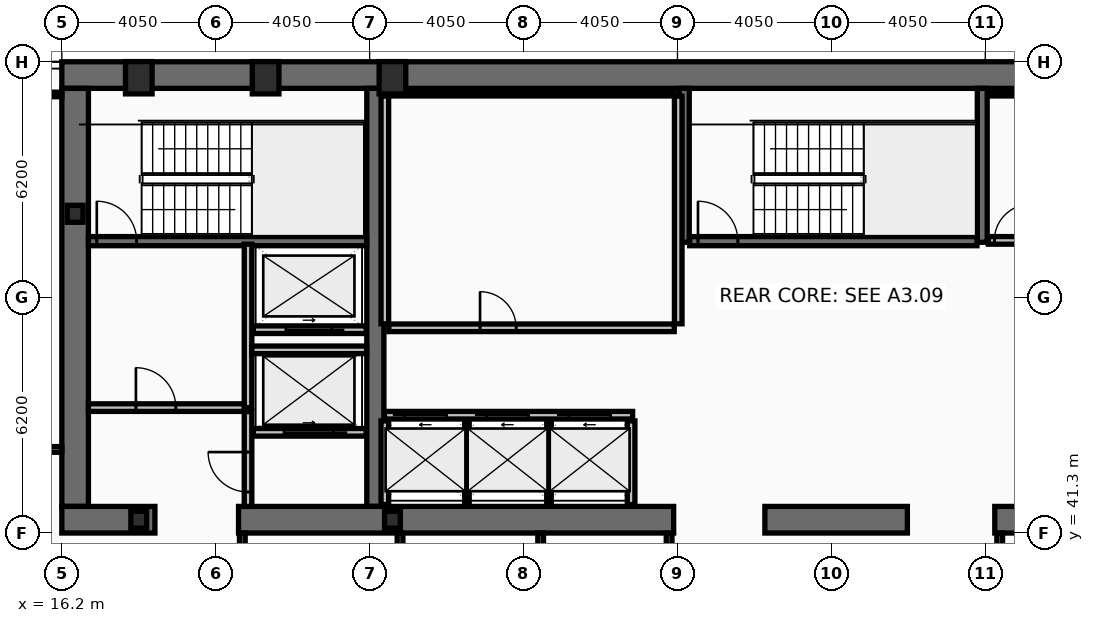
"""IFC4 building model, lengths in metres.
Left out: names, types, materials, properties, quantities, classifications, styles, units other than length and angle.
Written with IfcOpenShell. Run it as: python <this file> out.ifc"""

import sys

from ifc_helpers import new_model, si_unit, direction, frame, frame_2d, origin, origin_2d, place, context, subcontext, project, spatial, rectangle, hollow_rectangle, i_section, extrude, element, fill, save


model = new_model("IFC4")
c1 = context("Model", 3, precision=1e-05, world=origin(), true_north=direction((0.0, 1.0)))
c2 = subcontext(c1, "Body", "Model", "MODEL_VIEW")
j1 = project(units=[si_unit("LENGTHUNIT", "METRE"), si_unit("PLANEANGLEUNIT", "RADIAN")], contexts=[c1])
p1 = place(None, origin())
s1 = spatial("IfcSite", under=j1, at=p1, CompositionType="ELEMENT")
p2 = place(p1, origin())
s2 = spatial("IfcBuilding", under=s1, at=p2, CompositionType="ELEMENT")
p3 = place(p2, frame((0.0, 0.0, 136.2)))
s3 = spatial("IfcBuildingStorey", under=s2, at=p3, CompositionType="ELEMENT", Elevation=136.2)
p4 = place(p3, frame((16.2, 53.35, 0.0), z_axis=(0.0, 0.0, 1.0), x_axis=(1.0, 0.0, 0.0)))
e1 = element("IfcWall", 1, at=p4, inside=s3, PredefinedType="SHEAR", context=c2, shape_type="SweptSolid", body=[
    extrude(rectangle(XDim=40.5, YDim=0.7, at=frame_2d((20.25, 0.0))), origin(), (0.0, 0.0, 1.0), 3.44),
])
p5 = place(p3, frame((16.55, 42.0, 0.0), z_axis=(0.0, 0.0, 1.0), x_axis=(0.0, 1.0, 0.0)))
e2 = element("IfcWall", 2, at=p5, inside=s3, PredefinedType="SHEAR", context=c2, shape_type="SweptSolid", body=[
    extrude(rectangle(XDim=11.0, YDim=0.7, at=frame_2d((5.5, 0.0))), origin(), (0.0, 0.0, 1.0), 3.44),
])
p6 = place(p3, frame((24.45, 42.0, 0.0), z_axis=(0.0, 0.0, 1.0), x_axis=(0.0, 1.0, 0.0)))
e3 = element("IfcWall", 3, at=p6, inside=s3, PredefinedType="SHEAR", context=c2, shape_type="SweptSolid", body=[
    extrude(rectangle(XDim=11.0, YDim=0.45, at=frame_2d((5.5, 0.0))), origin(), (0.0, 0.0, 1.0), 3.44),
])
p7 = place(p3, frame((18.65, 41.65, 0.0), z_axis=(0.0, 0.0, 1.0), x_axis=(-1.0, 0.0, 0.0)))
e4 = element("IfcWall", 4, at=p7, inside=s3, PredefinedType="SHEAR", context=c2, shape_type="SweptSolid", body=[
    extrude(rectangle(XDim=2.45, YDim=0.7, at=frame_2d((1.225, 0.0))), origin(), (0.0, 0.0, 1.0), 3.44),
])
p8 = place(p3, frame((32.3, 41.65, 0.0), z_axis=(0.0, 0.0, 1.0), x_axis=(-1.0, 0.0, 0.0)))
e5 = element("IfcWall", 5, at=p8, inside=s3, PredefinedType="SHEAR", context=c2, shape_type="SweptSolid", body=[
    extrude(rectangle(XDim=11.45, YDim=0.7, at=frame_2d((5.725, 0.0))), origin(), (0.0, 0.0, 1.0), 3.44),
])
p9 = place(p3, frame((38.45, 41.65, 0.0), z_axis=(0.0, 0.0, 1.0), x_axis=(-1.0, 0.0, 0.0)))
e6 = element("IfcWall", 6, at=p9, inside=s3, PredefinedType="SHEAR", context=c2, shape_type="SweptSolid", body=[
    extrude(rectangle(XDim=3.75, YDim=0.7, at=frame_2d((1.875, 0.0))), origin(), (0.0, 0.0, 1.0), 3.44),
])
p10 = place(p3, frame((52.05, 41.65, 0.0), z_axis=(0.0, 0.0, 1.0), x_axis=(-1.0, 0.0, 0.0)))
e7 = element("IfcWall", 7, at=p10, inside=s3, PredefinedType="SHEAR", context=c2, shape_type="SweptSolid", body=[
    extrude(rectangle(XDim=11.3, YDim=0.7, at=frame_2d((5.65, 0.0))), origin(), (0.0, 0.0, 1.0), 3.44),
])
for number, where, z_axis, x_axis in (
    (8, (32.58, 48.95, 0.0), (0.0, 0.0, 1.0), (0.0, 1.0, 0.0)),
    (9, (40.42, 48.95, 0.0), (0.0, 0.0, 1.0), (0.0, 1.0, 0.0)),
):
    element("IfcWall", number, at=place(p3, frame(where, z_axis=z_axis, x_axis=x_axis)), inside=s3, PredefinedType="SHEAR", context=c2, shape_type="SweptSolid", body=[
        extrude(rectangle(XDim=4.05, YDim=0.26, at=frame_2d((2.025, 0.0))), origin(), (0.0, 0.0, 1.0), 3.44),
    ])
p11 = place(p3, frame((16.9, 48.98, 0.0), z_axis=(0.0, 0.0, 1.0), x_axis=(1.0, 0.0, 0.0)))
e10 = element("IfcWall", 10, at=p11, inside=s3, PredefinedType="SHEAR", context=c2, shape_type="SweptSolid", body=[
    extrude(rectangle(XDim=7.32, YDim=0.24, at=frame_2d((3.66, 0.0))), origin(), (0.0, 0.0, 1.0), 3.44),
])
p12 = place(p11, frame((0.22, 0.0, 0.0)))
e11 = element("IfcOpeningElement", 11, at=p12, cuts=e10, PredefinedType="OPENING", context=c2, shape_type="SweptSolid", body=[
    extrude(rectangle(XDim=1.05, YDim=2.15, at=frame_2d((0.525, 1.075))), frame((0.0, 0.13, 0.0), z_axis=(0.0, -1.0, 0.0), x_axis=(1.0, 0.0, 0.0)), (0.0, 0.0, 1.0), 0.26),
])
p13 = place(p3, frame((32.72, 48.98, 0.0), z_axis=(0.0, 0.0, 1.0), x_axis=(1.0, 0.0, 0.0)))
e12 = element("IfcWall", 12, at=p13, inside=s3, PredefinedType="SHEAR", context=c2, shape_type="SweptSolid", body=[
    extrude(rectangle(XDim=7.56, YDim=0.24, at=frame_2d((3.78, 0.0))), origin(), (0.0, 0.0, 1.0), 3.44),
])
p14 = place(p13, frame((0.22, 0.0, 0.0)))
e13 = element("IfcOpeningElement", 13, at=p14, cuts=e12, PredefinedType="OPENING", context=c2, shape_type="SweptSolid", body=[
    extrude(rectangle(XDim=1.05, YDim=2.15, at=frame_2d((0.525, 1.075))), frame((0.0, 0.13, 0.0), z_axis=(0.0, -1.0, 0.0), x_axis=(1.0, 0.0, 0.0)), (0.0, 0.0, 1.0), 0.26),
])
for number, where, z_axis, x_axis in (
    (14, (18.225, 53.28, 0.0), (0.0, 0.0, 1.0), (1.0, 0.0, 0.0)),
    (15, (21.562, 53.28, 0.0), (0.0, 0.0, 1.0), (1.0, 0.0, 0.0)),
    (16, (24.9, 53.28, 0.0), (0.0, 0.0, 1.0), (1.0, 0.0, 0.0)),
):
    element("IfcColumn", number, at=place(p3, frame(where, z_axis=z_axis, x_axis=x_axis)), inside=s3, PredefinedType="COLUMN", context=c2, shape_type="SweptSolid", body=[
        extrude(hollow_rectangle(XDim=0.7, YDim=0.85, WallThickness=0.05, at=origin_2d()), origin(), (0.0, 0.0, 1.0), 3.6),
    ])
for number, where, z_axis, x_axis in (
    (17, (16.55, 49.7, 0.0), (0.0, 0.0, 1.0), (1.0, 0.0, 0.0)),
    (18, (18.225, 41.65, 0.0), (0.0, 0.0, 1.0), (1.0, 0.0, 0.0)),
    (19, (24.9, 41.65, 0.0), (0.0, 0.0, 1.0), (1.0, 0.0, 0.0)),
):
    element("IfcColumn", number, at=place(p3, frame(where, z_axis=z_axis, x_axis=x_axis)), inside=s3, PredefinedType="COLUMN", context=c2, shape_type="SweptSolid", body=[
        extrude(i_section(OverallWidth=0.416, OverallDepth=0.446, WebThickness=0.039, FlangeThickness=0.063, at=origin_2d()), origin(), (0.0, 0.0, 1.0), 3.6),
    ])
p15 = place(p3, frame((24.69, 44.4, 0.0), z_axis=(0.0, 0.0, 1.0), x_axis=(1.0, 0.0, 0.0)))
e20 = element("IfcWall", 20, at=p15, inside=s3, PredefinedType="PARTITIONING", context=c2, shape_type="SweptSolid", body=[
    extrude(rectangle(XDim=6.53, YDim=0.2, at=frame_2d((3.265, 0.0))), origin(), (0.0, 0.0, 1.0), 3.44),
])
p16 = place(p15, frame((0.53, 0.0, 0.0)))
e21 = element("IfcOpeningElement", 21, at=p16, cuts=e20, PredefinedType="OPENING", context=c2, shape_type="SweptSolid", body=[
    extrude(rectangle(XDim=1.1, YDim=2.18, at=frame_2d((0.55, 1.09))), frame((0.0, 0.11, 0.0), z_axis=(0.0, -1.0, 0.0), x_axis=(1.0, 0.0, 0.0)), (0.0, 0.0, 1.0), 0.22),
])
p17 = place(p15, frame((2.69, 0.0, 0.0)))
e22 = element("IfcOpeningElement", 22, at=p17, cuts=e20, PredefinedType="OPENING", context=c2, shape_type="SweptSolid", body=[
    extrude(rectangle(XDim=1.1, YDim=2.18, at=frame_2d((0.55, 1.09))), frame((0.0, 0.11, 0.0), z_axis=(0.0, -1.0, 0.0), x_axis=(1.0, 0.0, 0.0)), (0.0, 0.0, 1.0), 0.22),
])
p18 = place(p15, frame((4.85, 0.0, 0.0)))
e23 = element("IfcOpeningElement", 23, at=p18, cuts=e20, PredefinedType="OPENING", context=c2, shape_type="SweptSolid", body=[
    extrude(rectangle(XDim=1.1, YDim=2.18, at=frame_2d((0.55, 1.09))), frame((0.0, 0.11, 0.0), z_axis=(0.0, -1.0, 0.0), x_axis=(1.0, 0.0, 0.0)), (0.0, 0.0, 1.0), 0.22),
])
p19 = place(p3, frame((24.21, 43.95, 0.0), z_axis=(0.0, 0.0, 1.0), x_axis=(-1.0, 0.0, 0.0)))
e24 = element("IfcWall", 24, at=p19, inside=s3, PredefinedType="PARTITIONING", context=c2, shape_type="SweptSolid", body=[
    extrude(rectangle(XDim=2.97, YDim=0.2, at=frame_2d((1.485, 0.0))), origin(), (0.0, 0.0, 1.0), 3.44),
])
p20 = place(p19, frame((0.86, 0.0, 0.0)))
e25 = element("IfcOpeningElement", 25, at=p20, cuts=e24, PredefinedType="OPENING", context=c2, shape_type="SweptSolid", body=[
    extrude(rectangle(XDim=1.3, YDim=2.18, at=frame_2d((0.65, 1.09))), frame((0.0, 0.11, 0.0), z_axis=(0.0, -1.0, 0.0), x_axis=(1.0, 0.0, 0.0)), (0.0, 0.0, 1.0), 0.22),
])
p21 = place(p3, frame((24.21, 46.65, 0.0), z_axis=(0.0, 0.0, 1.0), x_axis=(-1.0, 0.0, 0.0)))
e26 = element("IfcWall", 26, at=p21, inside=s3, PredefinedType="PARTITIONING", context=c2, shape_type="SweptSolid", body=[
    extrude(rectangle(XDim=2.97, YDim=0.2, at=frame_2d((1.485, 0.0))), origin(), (0.0, 0.0, 1.0), 3.44),
])
p22 = place(p21, frame((0.91, 0.0, 0.0)))
e27 = element("IfcOpeningElement", 27, at=p22, cuts=e26, PredefinedType="OPENING", context=c2, shape_type="SweptSolid", body=[
    extrude(rectangle(XDim=1.2, YDim=2.18, at=frame_2d((0.6, 1.09))), frame((0.0, 0.11, 0.0), z_axis=(0.0, -1.0, 0.0), x_axis=(1.0, 0.0, 0.0)), (0.0, 0.0, 1.0), 0.22),
])
p23 = place(p3, frame((21.1, 44.6, 0.0), z_axis=(0.0, 0.0, 1.0), x_axis=(0.0, 1.0, 0.0)))
e28 = element("IfcWall", 28, at=p23, inside=s3, PredefinedType="PARTITIONING", context=c2, shape_type="SweptSolid", body=[
    extrude(rectangle(XDim=4.3, YDim=0.2, at=frame_2d((2.15, 0.0))), origin(), (0.0, 0.0, 1.0), 3.44),
])
p24 = place(p3, frame((16.9, 44.6, 0.0), z_axis=(0.0, 0.0, 1.0), x_axis=(1.0, 0.0, 0.0)))
e29 = element("IfcWall", 29, at=p24, inside=s3, PredefinedType="PARTITIONING", context=c2, shape_type="SweptSolid", body=[
    extrude(rectangle(XDim=4.1, YDim=0.2, at=frame_2d((2.05, 0.0))), origin(), (0.0, 0.0, 1.0), 3.44),
])
p25 = place(p24, frame((1.25, 0.0, 0.0)))
e30 = element("IfcOpeningElement", 30, at=p25, cuts=e29, PredefinedType="OPENING", context=c2, shape_type="SweptSolid", body=[
    extrude(rectangle(XDim=1.05, YDim=2.15, at=frame_2d((0.525, 1.075))), frame((0.0, 0.11, 0.0), z_axis=(0.0, -1.0, 0.0), x_axis=(1.0, 0.0, 0.0)), (0.0, 0.0, 1.0), 0.22),
])
p26 = place(p3, frame((21.2, 46.12, 0.0), z_axis=(0.0, 0.0, 1.0), x_axis=(1.0, 0.0, 0.0)))
e31 = element("IfcWall", 31, at=p26, inside=s3, PredefinedType="PARTITIONING", context=c2, shape_type="SweptSolid", body=[
    extrude(rectangle(XDim=3.02, YDim=0.2, at=frame_2d((1.51, 0.0))), origin(), (0.0, 0.0, 1.0), 3.44),
])
p27 = place(p3, frame((21.1, 42.0, 0.0), z_axis=(0.0, 0.0, 1.0), x_axis=(0.0, 1.0, 0.0)))
e32 = element("IfcWall", 32, at=p27, inside=s3, PredefinedType="PARTITIONING", context=c2, shape_type="SweptSolid", body=[
    extrude(rectangle(XDim=2.495, YDim=0.2, at=frame_2d((1.248, 0.0))), origin(), (0.0, 0.0, 1.0), 3.44),
])
p28 = place(p27, frame((0.38, 0.0, 0.0)))
e33 = element("IfcOpeningElement", 33, at=p28, cuts=e32, PredefinedType="OPENING", context=c2, shape_type="SweptSolid", body=[
    extrude(rectangle(XDim=1.05, YDim=2.15, at=frame_2d((0.525, 1.075))), frame((0.0, 0.11, 0.0), z_axis=(0.0, -1.0, 0.0), x_axis=(1.0, 0.0, 0.0)), (0.0, 0.0, 1.0), 0.22),
])
for number, where, z_axis, x_axis in (
    (34, (24.7, 46.805, 0.0), (0.0, 0.0, 1.0), (0.0, 1.0, 0.0)),
    (35, (32.42, 46.805, 0.0), (0.0, 0.0, 1.0), (0.0, 1.0, 0.0)),
):
    element("IfcWall", number, at=place(p3, frame(where, z_axis=z_axis, x_axis=x_axis)), inside=s3, PredefinedType="PARTITIONING", context=c2, shape_type="SweptSolid", body=[
        extrude(rectangle(XDim=5.99, YDim=0.2, at=frame_2d((2.995, 0.0))), origin(), (0.0, 0.0, 1.0), 3.44),
    ])
p29 = place(p3, frame((24.805, 52.86, 0.0), z_axis=(0.0, 0.0, 1.0), x_axis=(1.0, 0.0, 0.0)))
e36 = element("IfcWall", 36, at=p29, inside=s3, PredefinedType="PARTITIONING", context=c2, shape_type="SweptSolid", body=[
    extrude(rectangle(XDim=7.51, YDim=0.12, at=frame_2d((3.755, 0.0))), origin(), (0.0, 0.0, 1.0), 3.44),
])
p30 = place(p3, frame((24.805, 46.7, 0.0), z_axis=(0.0, 0.0, 1.0), x_axis=(1.0, 0.0, 0.0)))
e37 = element("IfcWall", 37, at=p30, inside=s3, PredefinedType="PARTITIONING", context=c2, shape_type="SweptSolid", body=[
    extrude(rectangle(XDim=7.51, YDim=0.2, at=frame_2d((3.755, 0.0))), origin(), (0.0, 0.0, 1.0), 3.44),
])
p31 = place(p30, frame((2.4, 0.0, 0.0)))
e38 = element("IfcOpeningElement", 38, at=p31, cuts=e37, PredefinedType="OPENING", context=c2, shape_type="SweptSolid", body=[
    extrude(rectangle(XDim=0.95, YDim=2.1, at=frame_2d((0.475, 1.05))), frame((0.0, 0.11, 0.0), z_axis=(0.0, -1.0, 0.0), x_axis=(1.0, 0.0, 0.0)), (0.0, 0.0, 1.0), 0.22),
])
for number, where, z_axis, x_axis in (
    (39, (24.7, 42.05, 0.0), (0.0, 0.0, 1.0), (0.0, 1.0, 0.0)),
    (40, (31.18, 42.05, 0.0), (0.0, 0.0, 1.0), (0.0, 1.0, 0.0)),
):
    element("IfcWall", number, at=place(p3, frame(where, z_axis=z_axis, x_axis=x_axis)), inside=s3, PredefinedType="PARTITIONING", context=c2, shape_type="SweptSolid", body=[
        extrude(rectangle(XDim=2.2, YDim=0.2, at=frame_2d((1.1, 0.0))), origin(), (0.0, 0.0, 1.0), 3.44),
    ])
for number, where, z_axis, x_axis in (
    (41, (26.86, 42.05, 0.0), (0.0, 0.0, 1.0), (0.0, 1.0, 0.0)),
    (42, (29.02, 42.05, 0.0), (0.0, 0.0, 1.0), (0.0, 1.0, 0.0)),
):
    element("IfcWall", number, at=place(p3, frame(where, z_axis=z_axis, x_axis=x_axis)), inside=s3, PredefinedType="PARTITIONING", context=c2, shape_type="SweptSolid", body=[
        extrude(rectangle(XDim=2.2, YDim=0.12, at=frame_2d((1.1, 0.0))), origin(), (0.0, 0.0, 1.0), 3.44),
    ])
p32 = place(p3, frame((40.58, 52.86, 0.0), z_axis=(0.0, 0.0, 1.0), x_axis=(1.0, 0.0, 0.0)))
e43 = element("IfcWall", 43, at=p32, inside=s3, PredefinedType="PARTITIONING", context=c2, shape_type="SweptSolid", body=[
    extrude(rectangle(XDim=7.56, YDim=0.12, at=frame_2d((3.78, 0.0))), origin(), (0.0, 0.0, 1.0), 3.44),
])
p33 = place(p3, frame((40.58, 49.0, 0.0), z_axis=(0.0, 0.0, 1.0), x_axis=(1.0, 0.0, 0.0)))
e44 = element("IfcWall", 44, at=p33, inside=s3, PredefinedType="PARTITIONING", context=c2, shape_type="SweptSolid", body=[
    extrude(rectangle(XDim=7.56, YDim=0.2, at=frame_2d((3.78, 0.0))), origin(), (0.0, 0.0, 1.0), 3.44),
])
p34 = place(p33, frame((0.16, 0.0, 0.0)))
e45 = element("IfcOpeningElement", 45, at=p34, cuts=e44, PredefinedType="OPENING", context=c2, shape_type="SweptSolid", body=[
    extrude(rectangle(XDim=0.95, YDim=2.1, at=frame_2d((0.475, 1.05))), frame((0.0, 0.11, 0.0), z_axis=(0.0, -1.0, 0.0), x_axis=(1.0, 0.0, 0.0)), (0.0, 0.0, 1.0), 0.22),
])
p35 = place(p3, frame((20.95, 38.28, 0.0), z_axis=(0.0, 0.0, 1.0), x_axis=(0.0, 1.0, 0.0)))
e46 = element("IfcWall", 46, at=p35, inside=s3, PredefinedType="PARTITIONING", context=c2, shape_type="SweptSolid", body=[
    extrude(rectangle(XDim=3.02, YDim=0.15, at=frame_2d((1.51, 0.0))), origin(), (0.0, 0.0, 1.0), 3.44),
])
p36 = place(p3, frame((25.1, 38.28, 0.0), z_axis=(0.0, 0.0, 1.0), x_axis=(0.0, 1.0, 0.0)))
e47 = element("IfcWall", 47, at=p36, inside=s3, PredefinedType="PARTITIONING", context=c2, shape_type="SweptSolid", body=[
    extrude(rectangle(XDim=3.02, YDim=0.15, at=frame_2d((1.51, 0.0))), origin(), (0.0, 0.0, 1.0), 2.73),
])
for number, where, z_axis, x_axis in (
    (48, (28.8, 38.28, 0.0), (0.0, 0.0, 1.0), (0.0, 1.0, 0.0)),
    (49, (32.18, 38.28, 0.0), (0.0, 0.0, 1.0), (0.0, 1.0, 0.0)),
    (50, (40.88, 38.28, 0.0), (0.0, 0.0, 1.0), (0.0, 1.0, 0.0)),
):
    element("IfcWall", number, at=place(p3, frame(where, z_axis=z_axis, x_axis=x_axis)), inside=s3, PredefinedType="PARTITIONING", context=c2, shape_type="SweptSolid", body=[
        extrude(rectangle(XDim=3.02, YDim=0.15, at=frame_2d((1.51, 0.0))), origin(), (0.0, 0.0, 1.0), 3.44),
    ])
p37 = place(p3, frame((6.095, 43.5, 0.0), z_axis=(0.0, 0.0, 1.0), x_axis=(1.0, 0.0, 0.0)))
e51 = element("IfcWall", 51, at=p37, inside=s3, PredefinedType="PARTITIONING", context=c2, shape_type="SweptSolid", body=[
    extrude(rectangle(XDim=10.105, YDim=0.15, at=frame_2d((5.052, 0.0))), origin(), (0.0, 0.0, 1.0), 2.73),
])
p38 = place(p37, frame((8.32, 0.0, 0.0)))
e52 = element("IfcOpeningElement", 52, at=p38, cuts=e51, PredefinedType="OPENING", context=c2, shape_type="SweptSolid", body=[
    extrude(rectangle(XDim=0.9, YDim=2.05, at=frame_2d((0.45, 1.025))), frame((0.0, 0.085, 0.0), z_axis=(0.0, -1.0, 0.0), x_axis=(1.0, 0.0, 0.0)), (0.0, 0.0, 1.0), 0.17),
])
p39 = place(p3, frame((6.095, 52.84, 0.0), z_axis=(0.0, 0.0, 1.0), x_axis=(1.0, 0.0, 0.0)))
e53 = element("IfcWall", 53, at=p39, inside=s3, PredefinedType="PARTITIONING", context=c2, shape_type="SweptSolid", body=[
    extrude(rectangle(XDim=10.105, YDim=0.12, at=frame_2d((5.052, 0.0))), origin(), (0.0, 0.0, 1.0), 3.44),
])
p40 = place(p12, origin())
e54 = element("IfcDoor", 54, at=p40, inside=s3, OperationType="SINGLE_SWING_LEFT", PredefinedType="DOOR", context=c2, shape_type="SweptSolid", body=[
    extrude(rectangle(XDim=1.05, YDim=2.15, at=frame_2d((0.525, 1.075))), frame((0.0, 0.025, 0.0), z_axis=(0.0, -1.0, 0.0), x_axis=(1.0, 0.0, 0.0)), (0.0, 0.0, 1.0), 0.05),
])
fill(e11, e54)
p41 = place(p14, origin())
e55 = element("IfcDoor", 55, at=p41, inside=s3, OperationType="SINGLE_SWING_LEFT", PredefinedType="DOOR", context=c2, shape_type="SweptSolid", body=[
    extrude(rectangle(XDim=1.05, YDim=2.15, at=frame_2d((0.525, 1.075))), frame((0.0, 0.025, 0.0), z_axis=(0.0, -1.0, 0.0), x_axis=(1.0, 0.0, 0.0)), (0.0, 0.0, 1.0), 0.05),
])
fill(e13, e55)
p42 = place(p16, origin())
e56 = element("IfcDoor", 56, at=p42, inside=s3, OperationType="SLIDING_TO_LEFT", PredefinedType="DOOR", context=c2, shape_type="SweptSolid", body=[
    extrude(rectangle(XDim=1.1, YDim=2.18, at=frame_2d((0.55, 1.09))), frame((0.0, 0.025, 0.0), z_axis=(0.0, -1.0, 0.0), x_axis=(1.0, 0.0, 0.0)), (0.0, 0.0, 1.0), 0.05),
])
fill(e21, e56)
p43 = place(p17, origin())
e57 = element("IfcDoor", 57, at=p43, inside=s3, OperationType="SLIDING_TO_LEFT", PredefinedType="DOOR", context=c2, shape_type="SweptSolid", body=[
    extrude(rectangle(XDim=1.1, YDim=2.18, at=frame_2d((0.55, 1.09))), frame((0.0, 0.025, 0.0), z_axis=(0.0, -1.0, 0.0), x_axis=(1.0, 0.0, 0.0)), (0.0, 0.0, 1.0), 0.05),
])
fill(e22, e57)
p44 = place(p18, origin())
e58 = element("IfcDoor", 58, at=p44, inside=s3, OperationType="SLIDING_TO_LEFT", PredefinedType="DOOR", context=c2, shape_type="SweptSolid", body=[
    extrude(rectangle(XDim=1.1, YDim=2.18, at=frame_2d((0.55, 1.09))), frame((0.0, 0.025, 0.0), z_axis=(0.0, -1.0, 0.0), x_axis=(1.0, 0.0, 0.0)), (0.0, 0.0, 1.0), 0.05),
])
fill(e23, e58)
p45 = place(p20, origin())
e59 = element("IfcDoor", 59, at=p45, inside=s3, OperationType="SLIDING_TO_LEFT", PredefinedType="DOOR", context=c2, shape_type="SweptSolid", body=[
    extrude(rectangle(XDim=1.3, YDim=2.18, at=frame_2d((0.65, 1.09))), frame((0.0, 0.025, 0.0), z_axis=(0.0, -1.0, 0.0), x_axis=(1.0, 0.0, 0.0)), (0.0, 0.0, 1.0), 0.05),
])
fill(e25, e59)
p46 = place(p22, origin())
e60 = element("IfcDoor", 60, at=p46, inside=s3, OperationType="SLIDING_TO_LEFT", PredefinedType="DOOR", context=c2, shape_type="SweptSolid", body=[
    extrude(rectangle(XDim=1.2, YDim=2.18, at=frame_2d((0.6, 1.09))), frame((0.0, 0.025, 0.0), z_axis=(0.0, -1.0, 0.0), x_axis=(1.0, 0.0, 0.0)), (0.0, 0.0, 1.0), 0.05),
])
fill(e27, e60)
p47 = place(p25, origin())
e61 = element("IfcDoor", 61, at=p47, inside=s3, OperationType="SINGLE_SWING_LEFT", PredefinedType="DOOR", context=c2, shape_type="SweptSolid", body=[
    extrude(rectangle(XDim=1.05, YDim=2.15, at=frame_2d((0.525, 1.075))), frame((0.0, 0.025, 0.0), z_axis=(0.0, -1.0, 0.0), x_axis=(1.0, 0.0, 0.0)), (0.0, 0.0, 1.0), 0.05),
])
fill(e30, e61)
p48 = place(p28, origin())
e62 = element("IfcDoor", 62, at=p48, inside=s3, OperationType="SINGLE_SWING_RIGHT", PredefinedType="DOOR", context=c2, shape_type="SweptSolid", body=[
    extrude(rectangle(XDim=1.05, YDim=2.15, at=frame_2d((0.525, 1.075))), frame((0.0, 0.025, 0.0), z_axis=(0.0, -1.0, 0.0), x_axis=(1.0, 0.0, 0.0)), (0.0, 0.0, 1.0), 0.05),
])
fill(e33, e62)
p49 = place(p31, origin())
e63 = element("IfcDoor", 63, at=p49, inside=s3, OperationType="SINGLE_SWING_LEFT", PredefinedType="DOOR", context=c2, shape_type="SweptSolid", body=[
    extrude(rectangle(XDim=0.95, YDim=2.1, at=frame_2d((0.475, 1.05))), frame((0.0, 0.025, 0.0), z_axis=(0.0, -1.0, 0.0), x_axis=(1.0, 0.0, 0.0)), (0.0, 0.0, 1.0), 0.05),
])
fill(e38, e63)
p50 = place(p34, origin())
e64 = element("IfcDoor", 64, at=p50, inside=s3, OperationType="SINGLE_SWING_RIGHT", PredefinedType="DOOR", context=c2, shape_type="SweptSolid", body=[
    extrude(rectangle(XDim=0.95, YDim=2.1, at=frame_2d((0.475, 1.05))), frame((0.0, 0.025, 0.0), z_axis=(0.0, -1.0, 0.0), x_axis=(1.0, 0.0, 0.0)), (0.0, 0.0, 1.0), 0.05),
])
fill(e45, e64)
save(model, sys.argv[1])
